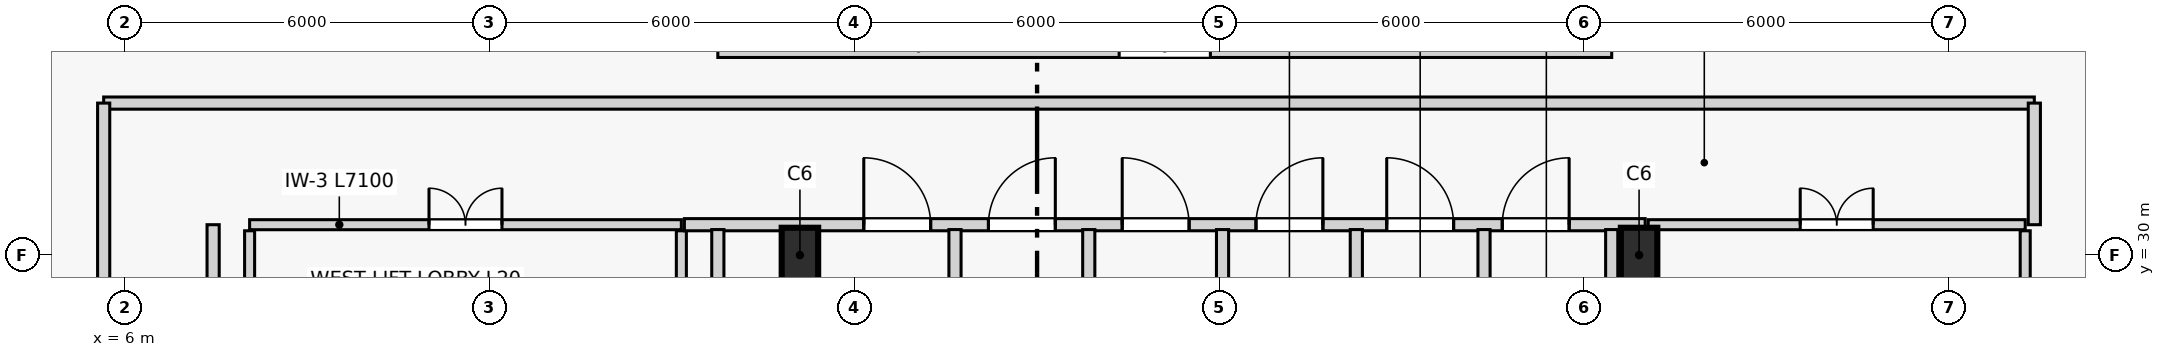
"""IFC4 building model, lengths in metres.
Left out: names, types, materials, properties, quantities, classifications, styles, units other than length and angle.
Written with IfcOpenShell. Run it as: python <this file> out.ifc"""

import sys

from ifc_helpers import new_model, si_unit, direction, frame, frame_2d, origin, origin_2d, place, context, subcontext, project, spatial, rectangle, extrude, source, transform, mapped, element, fill, save


model = new_model("IFC4")
c1 = context("Model", 3, precision=1e-05, world=origin(), true_north=direction((0.0, 1.0)))
c2 = subcontext(c1, "Body", "Model", "MODEL_VIEW")
j1 = project(units=[si_unit("LENGTHUNIT", "METRE"), si_unit("PLANEANGLEUNIT", "RADIAN")], contexts=[c1])
p1 = place(None, origin())
s1 = spatial("IfcSite", under=j1, at=p1, CompositionType="ELEMENT")
p2 = place(p1, origin())
s2 = spatial("IfcBuilding", under=s1, at=p2, CompositionType="ELEMENT")
p3 = place(p2, frame((0.0, 0.0, 76.5)))
s3 = spatial("IfcBuildingStorey", under=s2, at=p3, CompositionType="ELEMENT", Elevation=76.5)
m1 = source(origin(), c2, "Body", "SweptSolid", [
    extrude(rectangle(XDim=0.6, YDim=0.9, at=origin_2d()), origin(), (0.0, 0.0, 1.0), 7.2),
])
for number, where, z_axis, x_axis in (
    (1, (17.1, 30.0, 0.0), (0.0, 0.0, 1.0), (1.0, 0.0, 0.0)),
    (2, (30.9, 30.0, 0.0), (0.0, 0.0, 1.0), (1.0, 0.0, 0.0)),
):
    element("IfcColumn", number, at=place(p3, frame(where, z_axis=z_axis, x_axis=x_axis)), inside=s3, PredefinedType="COLUMN", context=c2, shape_type="MappedRepresentation", body=[
        mapped(m1, transform((0.0, 0.0, 0.0), scale=1.0)),
    ])
p4 = place(p3, frame((15.75, 33.4, 0.0), z_axis=(0.0, 0.0, 1.0), x_axis=(1.0, 0.0, 0.0)))
e3 = element("IfcWall", 3, at=p4, inside=s3, PredefinedType="SOLIDWALL", context=c2, shape_type="SweptSolid", body=[
    extrude(rectangle(XDim=14.7, YDim=0.3, at=frame_2d((7.35, 0.0))), origin(), (0.0, 0.0, 1.0), 6.55),
])
p5 = place(p4, frame((6.6, 0.0, 0.0)))
e4 = element("IfcOpeningElement", 4, at=p5, cuts=e3, PredefinedType="OPENING", context=c2, shape_type="SweptSolid", body=[
    extrude(rectangle(XDim=1.5, YDim=2.3, at=frame_2d((0.75, 1.15))), frame((0.0, 0.16, 0.0), z_axis=(0.0, -1.0, 0.0), x_axis=(1.0, 0.0, 0.0)), (0.0, 0.0, 1.0), 0.32),
])
p6 = place(p3, frame((8.05, 30.5, 0.0), z_axis=(0.0, 0.0, 1.0), x_axis=(1.0, 0.0, 0.0)))
e5 = element("IfcWall", 5, at=p6, inside=s3, PredefinedType="PARTITIONING", context=c2, shape_type="SweptSolid", body=[
    extrude(rectangle(XDim=7.1, YDim=0.165, at=frame_2d((3.55, 0.0))), origin(), (0.0, 0.0, 1.0), 4.95),
])
p7 = place(p6, frame((2.95, 0.0, 0.0)))
e6 = element("IfcOpeningElement", 6, at=p7, cuts=e5, PredefinedType="OPENING", context=c2, shape_type="SweptSolid", body=[
    extrude(rectangle(XDim=1.2, YDim=2.2, at=frame_2d((0.6, 1.1))), frame((0.0, 0.093, 0.0), z_axis=(0.0, -1.0, 0.0), x_axis=(1.0, 0.0, 0.0)), (0.0, 0.0, 1.0), 0.185),
])
for number, where, z_axis, x_axis in (
    (7, (8.05, 27.62, 0.0), (0.0, 0.0, 1.0), (0.0, 1.0, 0.0)),
    (8, (15.15, 27.62, 0.0), (0.0, 0.0, 1.0), (0.0, 1.0, 0.0)),
):
    element("IfcWall", number, at=place(p3, frame(where, z_axis=z_axis, x_axis=x_axis)), inside=s3, PredefinedType="PARTITIONING", context=c2, shape_type="SweptSolid", body=[
        extrude(rectangle(XDim=2.78, YDim=0.165, at=frame_2d((1.39, 0.0))), origin(), (0.0, 0.0, 1.0), 6.55),
    ])
p8 = place(p3, frame((31.05, 30.5, 0.0), z_axis=(0.0, 0.0, 1.0), x_axis=(1.0, 0.0, 0.0)))
e9 = element("IfcWall", 9, at=p8, inside=s3, PredefinedType="PARTITIONING", context=c2, shape_type="SweptSolid", body=[
    extrude(rectangle(XDim=6.2, YDim=0.165, at=frame_2d((3.1, 0.0))), origin(), (0.0, 0.0, 1.0), 4.95),
])
p9 = place(p8, frame((2.5, 0.0, 0.0)))
e10 = element("IfcOpeningElement", 10, at=p9, cuts=e9, PredefinedType="OPENING", context=c2, shape_type="SweptSolid", body=[
    extrude(rectangle(XDim=1.2, YDim=2.2, at=frame_2d((0.6, 1.1))), frame((0.0, 0.093, 0.0), z_axis=(0.0, -1.0, 0.0), x_axis=(1.0, 0.0, 0.0)), (0.0, 0.0, 1.0), 0.185),
])
p10 = place(p3, frame((31.05, 27.62, 0.0), z_axis=(0.0, 0.0, 1.0), x_axis=(0.0, 1.0, 0.0)))
e11 = element("IfcWall", 11, at=p10, inside=s3, PredefinedType="PARTITIONING", context=c2, shape_type="SweptSolid", body=[
    extrude(rectangle(XDim=2.78, YDim=0.165, at=frame_2d((1.39, 0.0))), origin(), (0.0, 0.0, 1.0), 4.95),
])
p11 = place(p3, frame((37.25, 27.62, 0.0), z_axis=(0.0, 0.0, 1.0), x_axis=(0.0, 1.0, 0.0)))
e12 = element("IfcWall", 12, at=p11, inside=s3, PredefinedType="PARTITIONING", context=c2, shape_type="SweptSolid", body=[
    extrude(rectangle(XDim=2.78, YDim=0.165, at=frame_2d((1.39, 0.0))), origin(), (0.0, 0.0, 1.0), 6.55),
])
p12 = place(p3, frame((5.65, 32.5, 0.0), z_axis=(0.0, 0.0, 1.0), x_axis=(1.0, 0.0, 0.0)))
e13 = element("IfcWall", 13, at=p12, inside=s3, PredefinedType="PARTITIONING", context=c2, shape_type="SweptSolid", body=[
    extrude(rectangle(XDim=31.75, YDim=0.2, at=frame_2d((15.875, 0.0))), origin(), (0.0, 0.0, 1.0), 6.55),
])
p13 = place(p3, frame((15.2, 30.5, 0.0), z_axis=(0.0, 0.0, 1.0), x_axis=(1.0, 0.0, 0.0)))
e14 = element("IfcWall", 14, at=p13, inside=s3, PredefinedType="PARTITIONING", context=c2, shape_type="SweptSolid", body=[
    extrude(rectangle(XDim=15.8, YDim=0.2, at=frame_2d((7.9, 0.0))), origin(), (0.0, 0.0, 1.0), 4.95),
])
p14 = place(p13, frame((2.95, 0.0, 0.0)))
e15 = element("IfcOpeningElement", 15, at=p14, cuts=e14, PredefinedType="OPENING", context=c2, shape_type="SweptSolid", body=[
    extrude(rectangle(XDim=1.1, YDim=2.2, at=frame_2d((0.55, 1.1))), frame((0.0, 0.11, 0.0), z_axis=(0.0, -1.0, 0.0), x_axis=(1.0, 0.0, 0.0)), (0.0, 0.0, 1.0), 0.22),
])
p15 = place(p13, frame((5.0, 0.0, 0.0)))
e16 = element("IfcOpeningElement", 16, at=p15, cuts=e14, PredefinedType="OPENING", context=c2, shape_type="SweptSolid", body=[
    extrude(rectangle(XDim=1.1, YDim=2.2, at=frame_2d((0.55, 1.1))), frame((0.0, 0.11, 0.0), z_axis=(0.0, -1.0, 0.0), x_axis=(1.0, 0.0, 0.0)), (0.0, 0.0, 1.0), 0.22),
])
p16 = place(p13, frame((7.2, 0.0, 0.0)))
e17 = element("IfcOpeningElement", 17, at=p16, cuts=e14, PredefinedType="OPENING", context=c2, shape_type="SweptSolid", body=[
    extrude(rectangle(XDim=1.1, YDim=2.2, at=frame_2d((0.55, 1.1))), frame((0.0, 0.11, 0.0), z_axis=(0.0, -1.0, 0.0), x_axis=(1.0, 0.0, 0.0)), (0.0, 0.0, 1.0), 0.22),
])
p17 = place(p13, frame((9.4, 0.0, 0.0)))
e18 = element("IfcOpeningElement", 18, at=p17, cuts=e14, PredefinedType="OPENING", context=c2, shape_type="SweptSolid", body=[
    extrude(rectangle(XDim=1.1, YDim=2.2, at=frame_2d((0.55, 1.1))), frame((0.0, 0.11, 0.0), z_axis=(0.0, -1.0, 0.0), x_axis=(1.0, 0.0, 0.0)), (0.0, 0.0, 1.0), 0.22),
])
p18 = place(p13, frame((11.55, 0.0, 0.0)))
e19 = element("IfcOpeningElement", 19, at=p18, cuts=e14, PredefinedType="OPENING", context=c2, shape_type="SweptSolid", body=[
    extrude(rectangle(XDim=1.1, YDim=2.2, at=frame_2d((0.55, 1.1))), frame((0.0, 0.11, 0.0), z_axis=(0.0, -1.0, 0.0), x_axis=(1.0, 0.0, 0.0)), (0.0, 0.0, 1.0), 0.22),
])
p19 = place(p13, frame((13.45, 0.0, 0.0)))
e20 = element("IfcOpeningElement", 20, at=p19, cuts=e14, PredefinedType="OPENING", context=c2, shape_type="SweptSolid", body=[
    extrude(rectangle(XDim=1.1, YDim=2.2, at=frame_2d((0.55, 1.1))), frame((0.0, 0.11, 0.0), z_axis=(0.0, -1.0, 0.0), x_axis=(1.0, 0.0, 0.0)), (0.0, 0.0, 1.0), 0.22),
])
p20 = place(p3, frame((37.4, 30.5, 0.0), z_axis=(0.0, 0.0, 1.0), x_axis=(0.0, 1.0, 0.0)))
e21 = element("IfcWall", 21, at=p20, inside=s3, PredefinedType="PARTITIONING", context=c2, shape_type="SweptSolid", body=[
    extrude(rectangle(XDim=2.0, YDim=0.2, at=frame_2d((1.0, 0.0))), origin(), (0.0, 0.0, 1.0), 6.55),
])
p21 = place(p3, frame((15.75, 25.1, 0.0), z_axis=(0.0, 0.0, 1.0), x_axis=(0.0, 1.0, 0.0)))
e22 = element("IfcWall", 22, at=p21, inside=s3, PredefinedType="PARTITIONING", context=c2, shape_type="SweptSolid", body=[
    extrude(rectangle(XDim=5.32, YDim=0.2, at=frame_2d((2.66, 0.0))), origin(), (0.0, 0.0, 1.0), 6.55),
])
p22 = place(p3, frame((30.45, 25.1, 0.0), z_axis=(0.0, 0.0, 1.0), x_axis=(0.0, 1.0, 0.0)))
e23 = element("IfcWall", 23, at=p22, inside=s3, PredefinedType="PARTITIONING", context=c2, shape_type="SweptSolid", body=[
    extrude(rectangle(XDim=5.32, YDim=0.2, at=frame_2d((2.66, 0.0))), origin(), (0.0, 0.0, 1.0), 4.95),
])
for number, where, z_axis, x_axis in (
    (24, (19.65, 25.18, 0.0), (0.0, 0.0, 1.0), (0.0, 1.0, 0.0)),
    (25, (21.85, 25.18, 0.0), (0.0, 0.0, 1.0), (0.0, 1.0, 0.0)),
    (26, (24.05, 25.18, 0.0), (0.0, 0.0, 1.0), (0.0, 1.0, 0.0)),
    (27, (26.25, 25.18, 0.0), (0.0, 0.0, 1.0), (0.0, 1.0, 0.0)),
    (28, (28.35, 25.18, 0.0), (0.0, 0.0, 1.0), (0.0, 1.0, 0.0)),
):
    element("IfcWall", number, at=place(p3, frame(where, z_axis=z_axis, x_axis=x_axis)), inside=s3, PredefinedType="PARTITIONING", context=c2, shape_type="SweptSolid", body=[
        extrude(rectangle(XDim=5.24, YDim=0.2, at=frame_2d((2.62, 0.0))), origin(), (0.0, 0.0, 1.0), 6.55),
    ])
p23 = place(p3, frame((5.65, 24.42, 0.0), z_axis=(0.0, 0.0, 1.0), x_axis=(0.0, 1.0, 0.0)))
e29 = element("IfcWall", 29, at=p23, inside=s3, PredefinedType="PARTITIONING", context=c2, shape_type="SweptSolid", body=[
    extrude(rectangle(XDim=8.08, YDim=0.2, at=frame_2d((4.04, 0.0))), origin(), (0.0, 0.0, 1.0), 4.95),
])
p24 = place(p3, frame((7.45, 26.8, 0.0), z_axis=(0.0, 0.0, 1.0), x_axis=(0.0, 1.0, 0.0)))
e30 = element("IfcWall", 30, at=p24, inside=s3, PredefinedType="PARTITIONING", context=c2, shape_type="SweptSolid", body=[
    extrude(rectangle(XDim=3.7, YDim=0.2, at=frame_2d((1.85, 0.0))), origin(), (0.0, 0.0, 1.0), 6.55),
])
m2 = source(origin(), c2, "Body", "SweptSolid", [
    extrude(rectangle(XDim=1.2, YDim=2.2, at=frame_2d((0.6, 1.1))), frame((0.0, 0.025, 0.0), z_axis=(0.0, -1.0, 0.0), x_axis=(1.0, 0.0, 0.0)), (0.0, 0.0, 1.0), 0.05),
])
p25 = place(p7, origin())
e31 = element("IfcDoor", 31, at=p25, inside=s3, OperationType="DOUBLE_DOOR_SINGLE_SWING", PredefinedType="DOOR", context=c2, shape_type="MappedRepresentation", body=[
    mapped(m2, transform((0.0, 0.0, 0.0), scale=1.0)),
])
fill(e6, e31)
p26 = place(p9, origin())
e32 = element("IfcDoor", 32, at=p26, inside=s3, OperationType="DOUBLE_DOOR_SINGLE_SWING", PredefinedType="DOOR", context=c2, shape_type="MappedRepresentation", body=[
    mapped(m2, transform((0.0, 0.0, 0.0), scale=1.0)),
])
fill(e10, e32)
m3 = source(origin(), c2, "Body", "SweptSolid", [
    extrude(rectangle(XDim=1.1, YDim=2.2, at=frame_2d((0.55, 1.1))), frame((0.0, 0.025, 0.0), z_axis=(0.0, -1.0, 0.0), x_axis=(1.0, 0.0, 0.0)), (0.0, 0.0, 1.0), 0.05),
])
p27 = place(p14, origin())
e33 = element("IfcDoor", 33, at=p27, inside=s3, OperationType="SINGLE_SWING_LEFT", PredefinedType="DOOR", context=c2, shape_type="MappedRepresentation", body=[
    mapped(m3, transform((0.0, 0.0, 0.0), scale=1.0)),
])
fill(e15, e33)
p28 = place(p15, origin())
e34 = element("IfcDoor", 34, at=p28, inside=s3, OperationType="SINGLE_SWING_RIGHT", PredefinedType="DOOR", context=c2, shape_type="MappedRepresentation", body=[
    mapped(m3, transform((0.0, 0.0, 0.0), scale=1.0)),
])
fill(e16, e34)
p29 = place(p16, origin())
e35 = element("IfcDoor", 35, at=p29, inside=s3, OperationType="SINGLE_SWING_LEFT", PredefinedType="DOOR", context=c2, shape_type="MappedRepresentation", body=[
    mapped(m3, transform((0.0, 0.0, 0.0), scale=1.0)),
])
fill(e17, e35)
p30 = place(p17, origin())
e36 = element("IfcDoor", 36, at=p30, inside=s3, OperationType="SINGLE_SWING_RIGHT", PredefinedType="DOOR", context=c2, shape_type="MappedRepresentation", body=[
    mapped(m3, transform((0.0, 0.0, 0.0), scale=1.0)),
])
fill(e18, e36)
p31 = place(p18, origin())
e37 = element("IfcDoor", 37, at=p31, inside=s3, OperationType="SINGLE_SWING_LEFT", PredefinedType="DOOR", context=c2, shape_type="MappedRepresentation", body=[
    mapped(m3, transform((0.0, 0.0, 0.0), scale=1.0)),
])
fill(e19, e37)
p32 = place(p19, origin())
e38 = element("IfcDoor", 38, at=p32, inside=s3, OperationType="SINGLE_SWING_RIGHT", PredefinedType="DOOR", context=c2, shape_type="MappedRepresentation", body=[
    mapped(m3, transform((0.0, 0.0, 0.0), scale=1.0)),
])
fill(e20, e38)
save(model, sys.argv[1])
